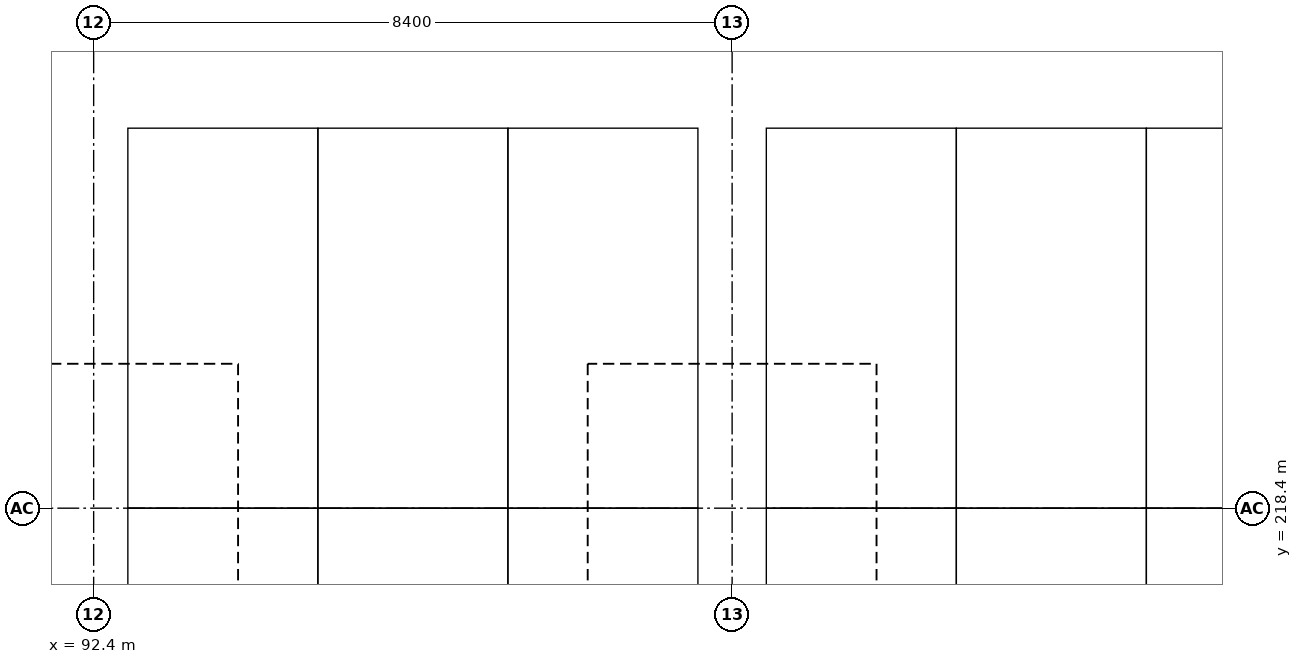
"""IFC4 building model, lengths in metres.
Left out: names, types, materials, properties, quantities, classifications, styles, units other than length and angle.
Written with IfcOpenShell. Run it as: python <this file> out.ifc"""

import sys

from ifc_helpers import new_model, si_unit, direction, frame, origin, origin_2d, place, context, subcontext, project, spatial, rectangle, extrude, element, save


model = new_model("IFC4")
c1 = context("Model", 3, precision=1e-05, world=origin(), true_north=direction((0.0, 1.0)))
c2 = subcontext(c1, "Body", "Model", "MODEL_VIEW")
j1 = project(units=[si_unit("LENGTHUNIT", "METRE"), si_unit("PLANEANGLEUNIT", "RADIAN")], contexts=[c1])
p1 = place(None, origin())
s1 = spatial("IfcSite", under=j1, at=p1, CompositionType="ELEMENT")
p2 = place(p1, origin())
s2 = spatial("IfcBuilding", under=s1, at=p2, CompositionType="ELEMENT")
p3 = place(p2, frame((0.0, 0.0, -3.0)))
s3 = spatial("IfcBuildingStorey", under=s2, at=p3, CompositionType="ELEMENT", Elevation=-3.0)
for number, where, z_axis, x_axis in (
    (1, (92.4, 218.4, 0.0), (0.0, 0.0, 1.0), (1.0, 0.0, 0.0)),
    (2, (100.8, 218.4, 0.0), (0.0, 0.0, 1.0), (1.0, 0.0, 0.0)),
):
    element("IfcColumn", number, at=place(p3, frame(where, z_axis=z_axis, x_axis=x_axis)), inside=s3, PredefinedType="COLUMN", context=c2, shape_type="SweptSolid", body=[
        extrude(rectangle(XDim=0.8, YDim=0.8, at=origin_2d()), origin(), (0.0, 0.0, 1.0), 2.4),
    ])
save(model, sys.argv[1])
